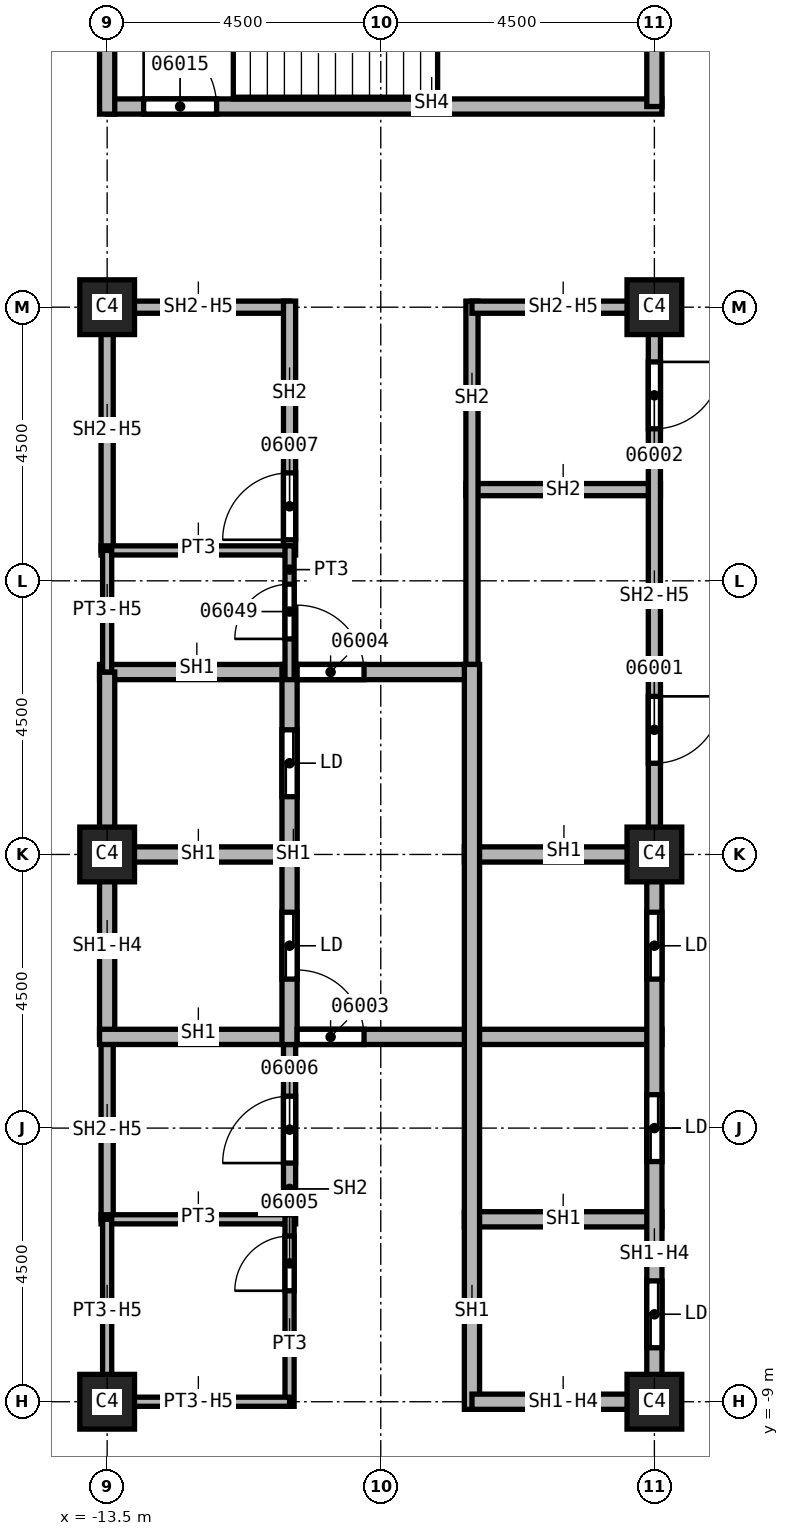
"""IFC4 building model, lengths in metres.
Left out: names, types, materials, properties, quantities, classifications, styles, units other than length and angle.
Written with IfcOpenShell. Run it as: python <this file> out.ifc"""

import sys

from ifc_helpers import new_model, si_unit, direction, frame, frame_2d, origin, origin_2d, place, context, subcontext, project, spatial, rectangle, extrude, element, fill, save


model = new_model("IFC4")
c1 = context("Model", 3, precision=1e-05, world=origin(), true_north=direction((0.0, 1.0)))
c2 = subcontext(c1, "Body", "Model", "MODEL_VIEW")
j1 = project(units=[si_unit("LENGTHUNIT", "METRE"), si_unit("PLANEANGLEUNIT", "RADIAN")], contexts=[c1])
p1 = place(None, origin())
s1 = spatial("IfcSite", under=j1, at=p1, CompositionType="ELEMENT")
p2 = place(p1, origin())
s2 = spatial("IfcBuilding", under=s1, at=p2, CompositionType="ELEMENT")
p3 = place(p2, frame((0.0, 0.0, 130.0)))
s3 = spatial("IfcBuildingStorey", under=s2, at=p3, CompositionType="ELEMENT", Elevation=130.0)
for number, where, z_axis, x_axis in (
    (1, (-4.5, 0.0, 0.0), (0.0, 0.0, 1.0), (1.0, 0.0, 0.0)),
    (2, (-4.5, 9.0, 0.0), (0.0, 0.0, 1.0), (1.0, 0.0, 0.0)),
    (3, (-4.5, -9.0, 0.0), (0.0, 0.0, 1.0), (1.0, 0.0, 0.0)),
    (4, (-13.5, 0.0, 0.0), (0.0, 0.0, 1.0), (1.0, 0.0, 0.0)),
    (5, (-13.5, 9.0, 0.0), (0.0, 0.0, 1.0), (1.0, 0.0, 0.0)),
    (6, (-13.5, -9.0, 0.0), (0.0, 0.0, 1.0), (1.0, 0.0, 0.0)),
):
    element("IfcColumn", number, at=place(p3, frame(where, z_axis=z_axis, x_axis=x_axis)), inside=s3, PredefinedType="COLUMN", context=c2, shape_type="SweptSolid", body=[
        extrude(rectangle(XDim=0.9, YDim=0.9, at=origin_2d()), origin(), (0.0, 0.0, 1.0), 3.7),
    ])
p4 = place(p3, frame((-13.5, -6.0, 0.0), z_axis=(0.0, 0.0, 1.0), x_axis=(0.0, 1.0, 0.0)))
e7 = element("IfcWall", 7, at=p4, inside=s3, PredefinedType="SOLIDWALL", context=c2, shape_type="SweptSolid", body=[
    extrude(rectangle(XDim=3.0, YDim=0.2, at=frame_2d((1.5, 0.0))), origin(), (0.0, 0.0, 1.0), 2.938),
])
p5 = place(p3, frame((-13.5, 5.0, 0.0), z_axis=(0.0, 0.0, 1.0), x_axis=(0.0, 1.0, 0.0)))
e8 = element("IfcWall", 8, at=p5, inside=s3, PredefinedType="SOLIDWALL", context=c2, shape_type="SweptSolid", body=[
    extrude(rectangle(XDim=4.1, YDim=0.2, at=frame_2d((2.05, 0.0))), origin(), (0.0, 0.0, 1.0), 2.938),
])
p6 = place(p3, frame((-13.5, 9.0, 0.0), z_axis=(0.0, 0.0, 1.0), x_axis=(1.0, 0.0, 0.0)))
e9 = element("IfcWall", 9, at=p6, inside=s3, PredefinedType="SOLIDWALL", context=c2, shape_type="SweptSolid", body=[
    extrude(rectangle(XDim=3.0, YDim=0.2, at=frame_2d((1.5, 0.0))), origin(), (0.0, 0.0, 1.0), 2.938),
])
p7 = place(p3, frame((-10.5, -6.075, 0.0), z_axis=(0.0, 0.0, 1.0), x_axis=(0.0, 1.0, 0.0)))
e10 = element("IfcWall", 10, at=p7, inside=s3, PredefinedType="SOLIDWALL", context=c2, shape_type="SweptSolid", body=[
    extrude(rectangle(XDim=3.2, YDim=0.2, at=frame_2d((1.6, 0.0))), origin(), (0.0, 0.0, 1.0), 3.7),
])
p8 = place(p7, frame((1.0, 0.0, 0.0)))
e11 = element("IfcOpeningElement", 11, at=p8, cuts=e10, PredefinedType="OPENING", context=c2, shape_type="SweptSolid", body=[
    extrude(rectangle(XDim=1.1, YDim=2.1, at=frame_2d((0.55, 1.05))), frame((0.0, 0.1, 0.0), z_axis=(0.0, -1.0, 0.0), x_axis=(1.0, 0.0, 0.0)), (0.0, 0.0, 1.0), 0.2),
])
p9 = place(p3, frame((-10.5, 4.925, 0.0), z_axis=(0.0, 0.0, 1.0), x_axis=(0.0, 1.0, 0.0)))
e12 = element("IfcWall", 12, at=p9, inside=s3, PredefinedType="SOLIDWALL", context=c2, shape_type="SweptSolid", body=[
    extrude(rectangle(XDim=4.175, YDim=0.2, at=frame_2d((2.087, 0.0))), origin(), (0.0, 0.0, 1.0), 3.7),
])
p10 = place(p9, frame((0.25, 0.0, 0.0)))
e13 = element("IfcOpeningElement", 13, at=p10, cuts=e12, PredefinedType="OPENING", context=c2, shape_type="SweptSolid", body=[
    extrude(rectangle(XDim=1.1, YDim=2.1, at=frame_2d((0.55, 1.05))), frame((0.0, 0.1, 0.0), z_axis=(0.0, -1.0, 0.0), x_axis=(1.0, 0.0, 0.0)), (0.0, 0.0, 1.0), 0.2),
])
p11 = place(p3, frame((-7.6, 6.0, 0.0), z_axis=(0.0, 0.0, 1.0), x_axis=(1.0, 0.0, 0.0)))
e14 = element("IfcWall", 14, at=p11, inside=s3, PredefinedType="SOLIDWALL", context=c2, shape_type="SweptSolid", body=[
    extrude(rectangle(XDim=3.2, YDim=0.2, at=frame_2d((1.6, 0.0))), origin(), (0.0, 0.0, 1.0), 3.7),
])
p12 = place(p3, frame((-7.5, 2.875, 0.0), z_axis=(0.0, 0.0, 1.0), x_axis=(0.0, 1.0, 0.0)))
e15 = element("IfcWall", 15, at=p12, inside=s3, PredefinedType="SOLIDWALL", context=c2, shape_type="SweptSolid", body=[
    extrude(rectangle(XDim=6.225, YDim=0.2, at=frame_2d((3.113, 0.0))), origin(), (0.0, 0.0, 1.0), 3.7),
])
p13 = place(p3, frame((-7.5, 9.0, 0.0), z_axis=(0.0, 0.0, 1.0), x_axis=(1.0, 0.0, 0.0)))
e16 = element("IfcWall", 16, at=p13, inside=s3, PredefinedType="SOLIDWALL", context=c2, shape_type="SweptSolid", body=[
    extrude(rectangle(XDim=3.0, YDim=0.2, at=frame_2d((1.5, 0.0))), origin(), (0.0, 0.0, 1.0), 2.938),
])
p14 = place(p3, frame((-4.5, 9.1, 0.0), z_axis=(0.0, 0.0, 1.0), x_axis=(0.0, -1.0, 0.0)))
e17 = element("IfcWall", 17, at=p14, inside=s3, PredefinedType="SOLIDWALL", context=c2, shape_type="SweptSolid", body=[
    extrude(rectangle(XDim=9.1, YDim=0.2, at=frame_2d((4.55, 0.0))), origin(), (0.0, 0.0, 1.0), 2.938),
])
p15 = place(p14, frame((6.5, 0.0, 0.0)))
e18 = element("IfcOpeningElement", 18, at=p15, cuts=e17, PredefinedType="OPENING", context=c2, shape_type="SweptSolid", body=[
    extrude(rectangle(XDim=1.1, YDim=2.1, at=frame_2d((0.55, 1.05))), frame((0.0, 0.1, 0.0), z_axis=(0.0, -1.0, 0.0), x_axis=(1.0, 0.0, 0.0)), (0.0, 0.0, 1.0), 0.2),
])
p16 = place(p14, frame((1.0, 0.0, 0.0)))
e19 = element("IfcOpeningElement", 19, at=p16, cuts=e17, PredefinedType="OPENING", context=c2, shape_type="SweptSolid", body=[
    extrude(rectangle(XDim=1.1, YDim=2.1, at=frame_2d((0.55, 1.05))), frame((0.0, 0.1, 0.0), z_axis=(0.0, -1.0, 0.0), x_axis=(1.0, 0.0, 0.0)), (0.0, 0.0, 1.0), 0.2),
])
p17 = place(p3, frame((-13.625, 0.0, 0.0), z_axis=(0.0, 0.0, 1.0), x_axis=(1.0, 0.0, 0.0)))
e20 = element("IfcWall", 20, at=p17, inside=s3, PredefinedType="SOLIDWALL", context=c2, shape_type="SweptSolid", body=[
    extrude(rectangle(XDim=3.125, YDim=0.25, at=frame_2d((1.562, 0.0))), origin(), (0.0, 0.0, 1.0), 3.7),
])
p18 = place(p3, frame((-13.625, 3.0, 0.0), z_axis=(0.0, 0.0, 1.0), x_axis=(1.0, 0.0, 0.0)))
e21 = element("IfcWall", 21, at=p18, inside=s3, PredefinedType="SOLIDWALL", context=c2, shape_type="SweptSolid", body=[
    extrude(rectangle(XDim=6.125, YDim=0.25, at=frame_2d((3.062, 0.0))), origin(), (0.0, 0.0, 1.0), 3.7),
])
p19 = place(p18, frame((3.25, 0.0, 0.0)))
e22 = element("IfcOpeningElement", 22, at=p19, cuts=e21, PredefinedType="OPENING", context=c2, shape_type="SweptSolid", body=[
    extrude(rectangle(XDim=1.1, YDim=2.1, at=frame_2d((0.55, 1.05))), frame((0.0, 0.125, 0.0), z_axis=(0.0, -1.0, 0.0), x_axis=(1.0, 0.0, 0.0)), (0.0, 0.0, 1.0), 0.25),
])
p20 = place(p3, frame((-13.5, -3.0, 0.0), z_axis=(0.0, 0.0, 1.0), x_axis=(0.0, 1.0, 0.0)))
e23 = element("IfcWall", 23, at=p20, inside=s3, PredefinedType="SOLIDWALL", context=c2, shape_type="SweptSolid", body=[
    extrude(rectangle(XDim=6.0, YDim=0.25, at=frame_2d((3.0, 0.0))), origin(), (0.0, 0.0, 1.0), 2.938),
])
p21 = place(p3, frame((-13.625, -3.0, 0.0), z_axis=(0.0, 0.0, 1.0), x_axis=(1.0, 0.0, 0.0)))
e24 = element("IfcWall", 24, at=p21, inside=s3, PredefinedType="SOLIDWALL", context=c2, shape_type="SweptSolid", body=[
    extrude(rectangle(XDim=9.25, YDim=0.25, at=frame_2d((4.625, 0.0))), origin(), (0.0, 0.0, 1.0), 3.7),
])
p22 = place(p21, frame((3.25, 0.0, 0.0)))
e25 = element("IfcOpeningElement", 25, at=p22, cuts=e24, PredefinedType="OPENING", context=c2, shape_type="SweptSolid", body=[
    extrude(rectangle(XDim=1.1, YDim=2.1, at=frame_2d((0.55, 1.05))), frame((0.0, 0.125, 0.0), z_axis=(0.0, -1.0, 0.0), x_axis=(1.0, 0.0, 0.0)), (0.0, 0.0, 1.0), 0.25),
])
p23 = place(p3, frame((-10.5, -3.125, 0.0), z_axis=(0.0, 0.0, 1.0), x_axis=(0.0, 1.0, 0.0)))
e26 = element("IfcWall", 26, at=p23, inside=s3, PredefinedType="SOLIDWALL", context=c2, shape_type="SweptSolid", body=[
    extrude(rectangle(XDim=6.25, YDim=0.25, at=frame_2d((3.125, 0.0))), origin(), (0.0, 0.0, 1.0), 3.7),
])
p24 = place(p23, frame((1.075, 0.0, 0.0)))
e27 = element("IfcOpeningElement", 27, at=p24, cuts=e26, PredefinedType="OPENING", context=c2, shape_type="SweptSolid", body=[
    extrude(rectangle(XDim=1.1, YDim=2.1, at=frame_2d((0.55, 1.05))), frame((0.0, 0.125, 0.0), z_axis=(0.0, -1.0, 0.0), x_axis=(1.0, 0.0, 0.0)), (0.0, 0.0, 1.0), 0.25),
])
p25 = place(p23, frame((4.075, 0.0, 0.0)))
e28 = element("IfcOpeningElement", 28, at=p25, cuts=e26, PredefinedType="OPENING", context=c2, shape_type="SweptSolid", body=[
    extrude(rectangle(XDim=1.1, YDim=2.1, at=frame_2d((0.55, 1.05))), frame((0.0, 0.125, 0.0), z_axis=(0.0, -1.0, 0.0), x_axis=(1.0, 0.0, 0.0)), (0.0, 0.0, 1.0), 0.25),
])
for number, where, z_axis, x_axis in (
    (29, (-7.625, -6.0, 0.0), (0.0, 0.0, 1.0), (1.0, 0.0, 0.0)),
    (30, (-7.625, 0.0, 0.0), (0.0, 0.0, 1.0), (1.0, 0.0, 0.0)),
):
    element("IfcWall", number, at=place(p3, frame(where, z_axis=z_axis, x_axis=x_axis)), inside=s3, PredefinedType="SOLIDWALL", context=c2, shape_type="SweptSolid", body=[
        extrude(rectangle(XDim=3.25, YDim=0.25, at=frame_2d((1.625, 0.0))), origin(), (0.0, 0.0, 1.0), 3.7),
    ])
p26 = place(p3, frame((-7.5, -9.125, 0.0), z_axis=(0.0, 0.0, 1.0), x_axis=(0.0, 1.0, 0.0)))
e31 = element("IfcWall", 31, at=p26, inside=s3, PredefinedType="SOLIDWALL", context=c2, shape_type="SweptSolid", body=[
    extrude(rectangle(XDim=12.25, YDim=0.25, at=frame_2d((6.125, 0.0))), origin(), (0.0, 0.0, 1.0), 3.7),
])
p27 = place(p3, frame((-4.5, -9.0, 0.0), z_axis=(0.0, 0.0, 1.0), x_axis=(-1.0, 0.0, 0.0)))
e32 = element("IfcWall", 32, at=p27, inside=s3, PredefinedType="SOLIDWALL", context=c2, shape_type="SweptSolid", body=[
    extrude(rectangle(XDim=3.0, YDim=0.25, at=frame_2d((1.5, 0.0))), origin(), (0.0, 0.0, 1.0), 2.938),
])
p28 = place(p3, frame((-4.5, 0.0, 0.0), z_axis=(0.0, 0.0, 1.0), x_axis=(0.0, -1.0, 0.0)))
e33 = element("IfcWall", 33, at=p28, inside=s3, PredefinedType="SOLIDWALL", context=c2, shape_type="SweptSolid", body=[
    extrude(rectangle(XDim=9.125, YDim=0.25, at=frame_2d((4.562, 0.0))), origin(), (0.0, 0.0, 1.0), 2.938),
])
p29 = place(p28, frame((7.012, 0.0, 0.0)))
e34 = element("IfcOpeningElement", 34, at=p29, cuts=e33, PredefinedType="OPENING", context=c2, shape_type="SweptSolid", body=[
    extrude(rectangle(XDim=1.1, YDim=2.1, at=frame_2d((0.55, 1.05))), frame((0.0, 0.125, 0.0), z_axis=(0.0, -1.0, 0.0), x_axis=(1.0, 0.0, 0.0)), (0.0, 0.0, 1.0), 0.25),
])
p30 = place(p28, frame((3.95, 0.0, 0.0)))
e35 = element("IfcOpeningElement", 35, at=p30, cuts=e33, PredefinedType="OPENING", context=c2, shape_type="SweptSolid", body=[
    extrude(rectangle(XDim=1.1, YDim=2.1, at=frame_2d((0.55, 1.05))), frame((0.0, 0.125, 0.0), z_axis=(0.0, -1.0, 0.0), x_axis=(1.0, 0.0, 0.0)), (0.0, 0.0, 1.0), 0.25),
])
p31 = place(p28, frame((0.95, 0.0, 0.0)))
e36 = element("IfcOpeningElement", 36, at=p31, cuts=e33, PredefinedType="OPENING", context=c2, shape_type="SweptSolid", body=[
    extrude(rectangle(XDim=1.1, YDim=2.1, at=frame_2d((0.55, 1.05))), frame((0.0, 0.125, 0.0), z_axis=(0.0, -1.0, 0.0), x_axis=(1.0, 0.0, 0.0)), (0.0, 0.0, 1.0), 0.25),
])
p32 = place(p3, frame((-13.5, 12.3, 0.0), z_axis=(0.0, 0.0, 1.0), x_axis=(1.0, 0.0, 0.0)))
e37 = element("IfcWall", 37, at=p32, inside=s3, PredefinedType="SOLIDWALL", context=c2, shape_type="SweptSolid", body=[
    extrude(rectangle(XDim=9.125, YDim=0.25, at=frame_2d((4.562, 0.0))), origin(), (0.0, 0.0, 1.0), 3.7),
])
p33 = place(p32, frame((0.6, 0.0, 0.0)))
e38 = element("IfcOpeningElement", 38, at=p33, cuts=e37, PredefinedType="OPENING", context=c2, shape_type="SweptSolid", body=[
    extrude(rectangle(XDim=1.2, YDim=2.1, at=frame_2d((0.6, 1.05))), frame((0.0, 0.125, 0.0), z_axis=(0.0, -1.0, 0.0), x_axis=(1.0, 0.0, 0.0)), (0.0, 0.0, 1.0), 0.25),
])
p34 = place(p3, frame((-13.5, 12.175, 0.0), z_axis=(0.0, 0.0, 1.0), x_axis=(0.0, 1.0, 0.0)))
e39 = element("IfcWall", 39, at=p34, inside=s3, PredefinedType="SOLIDWALL", context=c2, shape_type="SweptSolid", body=[
    extrude(rectangle(XDim=4.75, YDim=0.25, at=frame_2d((2.375, 0.0))), origin(), (0.0, 0.0, 1.0), 3.7),
])
p35 = place(p3, frame((-4.5, 16.8, 0.0), z_axis=(0.0, 0.0, 1.0), x_axis=(0.0, -1.0, 0.0)))
e40 = element("IfcWall", 40, at=p35, inside=s3, PredefinedType="SOLIDWALL", context=c2, shape_type="SweptSolid", body=[
    extrude(rectangle(XDim=4.5, YDim=0.25, at=frame_2d((2.25, 0.0))), origin(), (0.0, 0.0, 1.0), 3.7),
])
for number, where, z_axis, x_axis in (
    (41, (-13.6, -6.0, 0.0), (0.0, 0.0, 1.0), (1.0, 0.0, 0.0)),
    (42, (-13.6, 5.0, 0.0), (0.0, 0.0, 1.0), (1.0, 0.0, 0.0)),
):
    element("IfcWall", number, at=place(p3, frame(where, z_axis=z_axis, x_axis=x_axis)), inside=s3, PredefinedType="PARTITIONING", context=c2, shape_type="SweptSolid", body=[
        extrude(rectangle(XDim=3.1, YDim=0.15, at=frame_2d((1.55, 0.0))), origin(), (0.0, 0.0, 1.0), 3.7),
    ])
p36 = place(p3, frame((-13.5, -9.075, 0.0), z_axis=(0.0, 0.0, 1.0), x_axis=(0.0, 1.0, 0.0)))
e43 = element("IfcWall", 43, at=p36, inside=s3, PredefinedType="PARTITIONING", context=c2, shape_type="SweptSolid", body=[
    extrude(rectangle(XDim=3.075, YDim=0.15, at=frame_2d((1.538, 0.0))), origin(), (0.0, 0.0, 1.0), 2.938),
])
p37 = place(p3, frame((-13.5, 3.0, 0.0), z_axis=(0.0, 0.0, 1.0), x_axis=(0.0, 1.0, 0.0)))
e44 = element("IfcWall", 44, at=p37, inside=s3, PredefinedType="PARTITIONING", context=c2, shape_type="SweptSolid", body=[
    extrude(rectangle(XDim=2.0, YDim=0.15, at=frame_2d((1.0, 0.0))), origin(), (0.0, 0.0, 1.0), 2.938),
])
p38 = place(p3, frame((-10.5, -9.075, 0.0), z_axis=(0.0, 0.0, 1.0), x_axis=(0.0, 1.0, 0.0)))
e45 = element("IfcWall", 45, at=p38, inside=s3, PredefinedType="PARTITIONING", context=c2, shape_type="SweptSolid", body=[
    extrude(rectangle(XDim=3.15, YDim=0.15, at=frame_2d((1.575, 0.0))), origin(), (0.0, 0.0, 1.0), 3.7),
])
p39 = place(p38, frame((1.9, 0.0, 0.0)))
e46 = element("IfcOpeningElement", 46, at=p39, cuts=e45, PredefinedType="OPENING", context=c2, shape_type="SweptSolid", body=[
    extrude(rectangle(XDim=0.9, YDim=2.1, at=frame_2d((0.45, 1.05))), frame((0.0, 0.075, 0.0), z_axis=(0.0, -1.0, 0.0), x_axis=(1.0, 0.0, 0.0)), (0.0, 0.0, 1.0), 0.15),
])
p40 = place(p3, frame((-10.5, -9.0, 0.0), z_axis=(0.0, 0.0, 1.0), x_axis=(-1.0, 0.0, 0.0)))
e47 = element("IfcWall", 47, at=p40, inside=s3, PredefinedType="PARTITIONING", context=c2, shape_type="SweptSolid", body=[
    extrude(rectangle(XDim=3.0, YDim=0.15, at=frame_2d((1.5, 0.0))), origin(), (0.0, 0.0, 1.0), 2.938),
])
p41 = place(p3, frame((-10.5, 2.875, 0.0), z_axis=(0.0, 0.0, 1.0), x_axis=(0.0, 1.0, 0.0)))
e48 = element("IfcWall", 48, at=p41, inside=s3, PredefinedType="PARTITIONING", context=c2, shape_type="SweptSolid", body=[
    extrude(rectangle(XDim=2.2, YDim=0.15, at=frame_2d((1.1, 0.0))), origin(), (0.0, 0.0, 1.0), 3.7),
])
p42 = place(p41, frame((0.67, 0.0, 0.0)))
e49 = element("IfcOpeningElement", 49, at=p42, cuts=e48, PredefinedType="OPENING", context=c2, shape_type="SweptSolid", body=[
    extrude(rectangle(XDim=0.9, YDim=2.1, at=frame_2d((0.45, 1.05))), frame((0.0, 0.075, 0.0), z_axis=(0.0, -1.0, 0.0), x_axis=(1.0, 0.0, 0.0)), (0.0, 0.0, 1.0), 0.15),
])
p43 = place(p15, origin())
e50 = element("IfcDoor", 50, at=p43, inside=s3, OperationType="SINGLE_SWING_RIGHT", PredefinedType="DOOR", context=c2, shape_type="SweptSolid", body=[
    extrude(rectangle(XDim=1.1, YDim=2.1, at=frame_2d((0.55, 1.05))), frame((0.0, 0.025, 0.0), z_axis=(0.0, -1.0, 0.0), x_axis=(1.0, 0.0, 0.0)), (0.0, 0.0, 1.0), 0.05),
])
fill(e18, e50)
p44 = place(p16, origin())
e51 = element("IfcDoor", 51, at=p44, inside=s3, OperationType="SINGLE_SWING_LEFT", PredefinedType="DOOR", context=c2, shape_type="SweptSolid", body=[
    extrude(rectangle(XDim=1.1, YDim=2.1, at=frame_2d((0.55, 1.05))), frame((0.0, 0.025, 0.0), z_axis=(0.0, -1.0, 0.0), x_axis=(1.0, 0.0, 0.0)), (0.0, 0.0, 1.0), 0.05),
])
fill(e19, e51)
p45 = place(p22, origin())
e52 = element("IfcDoor", 52, at=p45, inside=s3, OperationType="SINGLE_SWING_RIGHT", PredefinedType="DOOR", context=c2, shape_type="SweptSolid", body=[
    extrude(rectangle(XDim=1.1, YDim=2.1, at=frame_2d((0.55, 1.05))), frame((0.0, 0.025, 0.0), z_axis=(0.0, -1.0, 0.0), x_axis=(1.0, 0.0, 0.0)), (0.0, 0.0, 1.0), 0.05),
])
fill(e25, e52)
p46 = place(p19, origin())
e53 = element("IfcDoor", 53, at=p46, inside=s3, OperationType="SINGLE_SWING_LEFT", PredefinedType="DOOR", context=c2, shape_type="SweptSolid", body=[
    extrude(rectangle(XDim=1.1, YDim=2.1, at=frame_2d((0.55, 1.05))), frame((0.0, 0.025, 0.0), z_axis=(0.0, -1.0, 0.0), x_axis=(1.0, 0.0, 0.0)), (0.0, 0.0, 1.0), 0.05),
])
fill(e22, e53)
p47 = place(p39, origin())
e54 = element("IfcDoor", 54, at=p47, inside=s3, OperationType="SINGLE_SWING_RIGHT", PredefinedType="DOOR", context=c2, shape_type="SweptSolid", body=[
    extrude(rectangle(XDim=0.9, YDim=2.1, at=frame_2d((0.45, 1.05))), frame((0.0, 0.025, 0.0), z_axis=(0.0, -1.0, 0.0), x_axis=(1.0, 0.0, 0.0)), (0.0, 0.0, 1.0), 0.05),
])
fill(e46, e54)
p48 = place(p8, origin())
e55 = element("IfcDoor", 55, at=p48, inside=s3, OperationType="SINGLE_SWING_LEFT", PredefinedType="DOOR", context=c2, shape_type="SweptSolid", body=[
    extrude(rectangle(XDim=1.1, YDim=2.1, at=frame_2d((0.55, 1.05))), frame((0.0, 0.025, 0.0), z_axis=(0.0, -1.0, 0.0), x_axis=(1.0, 0.0, 0.0)), (0.0, 0.0, 1.0), 0.05),
])
fill(e11, e55)
p49 = place(p10, origin())
e56 = element("IfcDoor", 56, at=p49, inside=s3, OperationType="SINGLE_SWING_RIGHT", PredefinedType="DOOR", context=c2, shape_type="SweptSolid", body=[
    extrude(rectangle(XDim=1.1, YDim=2.1, at=frame_2d((0.55, 1.05))), frame((0.0, 0.025, 0.0), z_axis=(0.0, -1.0, 0.0), x_axis=(1.0, 0.0, 0.0)), (0.0, 0.0, 1.0), 0.05),
])
fill(e13, e56)
p50 = place(p33, origin())
e57 = element("IfcDoor", 57, at=p50, inside=s3, OperationType="SINGLE_SWING_RIGHT", PredefinedType="DOOR", context=c2, shape_type="SweptSolid", body=[
    extrude(rectangle(XDim=1.2, YDim=2.1, at=frame_2d((0.6, 1.05))), frame((0.0, 0.025, 0.0), z_axis=(0.0, -1.0, 0.0), x_axis=(1.0, 0.0, 0.0)), (0.0, 0.0, 1.0), 0.05),
])
fill(e38, e57)
p51 = place(p42, origin())
e58 = element("IfcDoor", 58, at=p51, inside=s3, OperationType="SINGLE_SWING_LEFT", PredefinedType="DOOR", context=c2, shape_type="SweptSolid", body=[
    extrude(rectangle(XDim=0.9, YDim=2.1, at=frame_2d((0.45, 1.05))), frame((0.0, 0.025, 0.0), z_axis=(0.0, -1.0, 0.0), x_axis=(1.0, 0.0, 0.0)), (0.0, 0.0, 1.0), 0.05),
])
fill(e49, e58)
p52 = place(p29, origin())
e59 = element("IfcDoor", 59, at=p52, inside=s3, OperationType="SLIDING_TO_LEFT", PredefinedType="DOOR", context=c2, shape_type="SweptSolid", body=[
    extrude(rectangle(XDim=1.1, YDim=2.1, at=frame_2d((0.55, 1.05))), frame((0.0, 0.025, 0.0), z_axis=(0.0, -1.0, 0.0), x_axis=(1.0, 0.0, 0.0)), (0.0, 0.0, 1.0), 0.05),
])
fill(e34, e59)
p53 = place(p30, origin())
e60 = element("IfcDoor", 60, at=p53, inside=s3, OperationType="SLIDING_TO_LEFT", PredefinedType="DOOR", context=c2, shape_type="SweptSolid", body=[
    extrude(rectangle(XDim=1.1, YDim=2.1, at=frame_2d((0.55, 1.05))), frame((0.0, 0.025, 0.0), z_axis=(0.0, -1.0, 0.0), x_axis=(1.0, 0.0, 0.0)), (0.0, 0.0, 1.0), 0.05),
])
fill(e35, e60)
p54 = place(p31, origin())
e61 = element("IfcDoor", 61, at=p54, inside=s3, OperationType="SLIDING_TO_LEFT", PredefinedType="DOOR", context=c2, shape_type="SweptSolid", body=[
    extrude(rectangle(XDim=1.1, YDim=2.1, at=frame_2d((0.55, 1.05))), frame((0.0, 0.025, 0.0), z_axis=(0.0, -1.0, 0.0), x_axis=(1.0, 0.0, 0.0)), (0.0, 0.0, 1.0), 0.05),
])
fill(e36, e61)
p55 = place(p24, origin())
e62 = element("IfcDoor", 62, at=p55, inside=s3, OperationType="SLIDING_TO_LEFT", PredefinedType="DOOR", context=c2, shape_type="SweptSolid", body=[
    extrude(rectangle(XDim=1.1, YDim=2.1, at=frame_2d((0.55, 1.05))), frame((0.0, 0.025, 0.0), z_axis=(0.0, -1.0, 0.0), x_axis=(1.0, 0.0, 0.0)), (0.0, 0.0, 1.0), 0.05),
])
fill(e27, e62)
p56 = place(p25, origin())
e63 = element("IfcDoor", 63, at=p56, inside=s3, OperationType="SLIDING_TO_LEFT", PredefinedType="DOOR", context=c2, shape_type="SweptSolid", body=[
    extrude(rectangle(XDim=1.1, YDim=2.1, at=frame_2d((0.55, 1.05))), frame((0.0, 0.025, 0.0), z_axis=(0.0, -1.0, 0.0), x_axis=(1.0, 0.0, 0.0)), (0.0, 0.0, 1.0), 0.05),
])
fill(e28, e63)
save(model, sys.argv[1])
